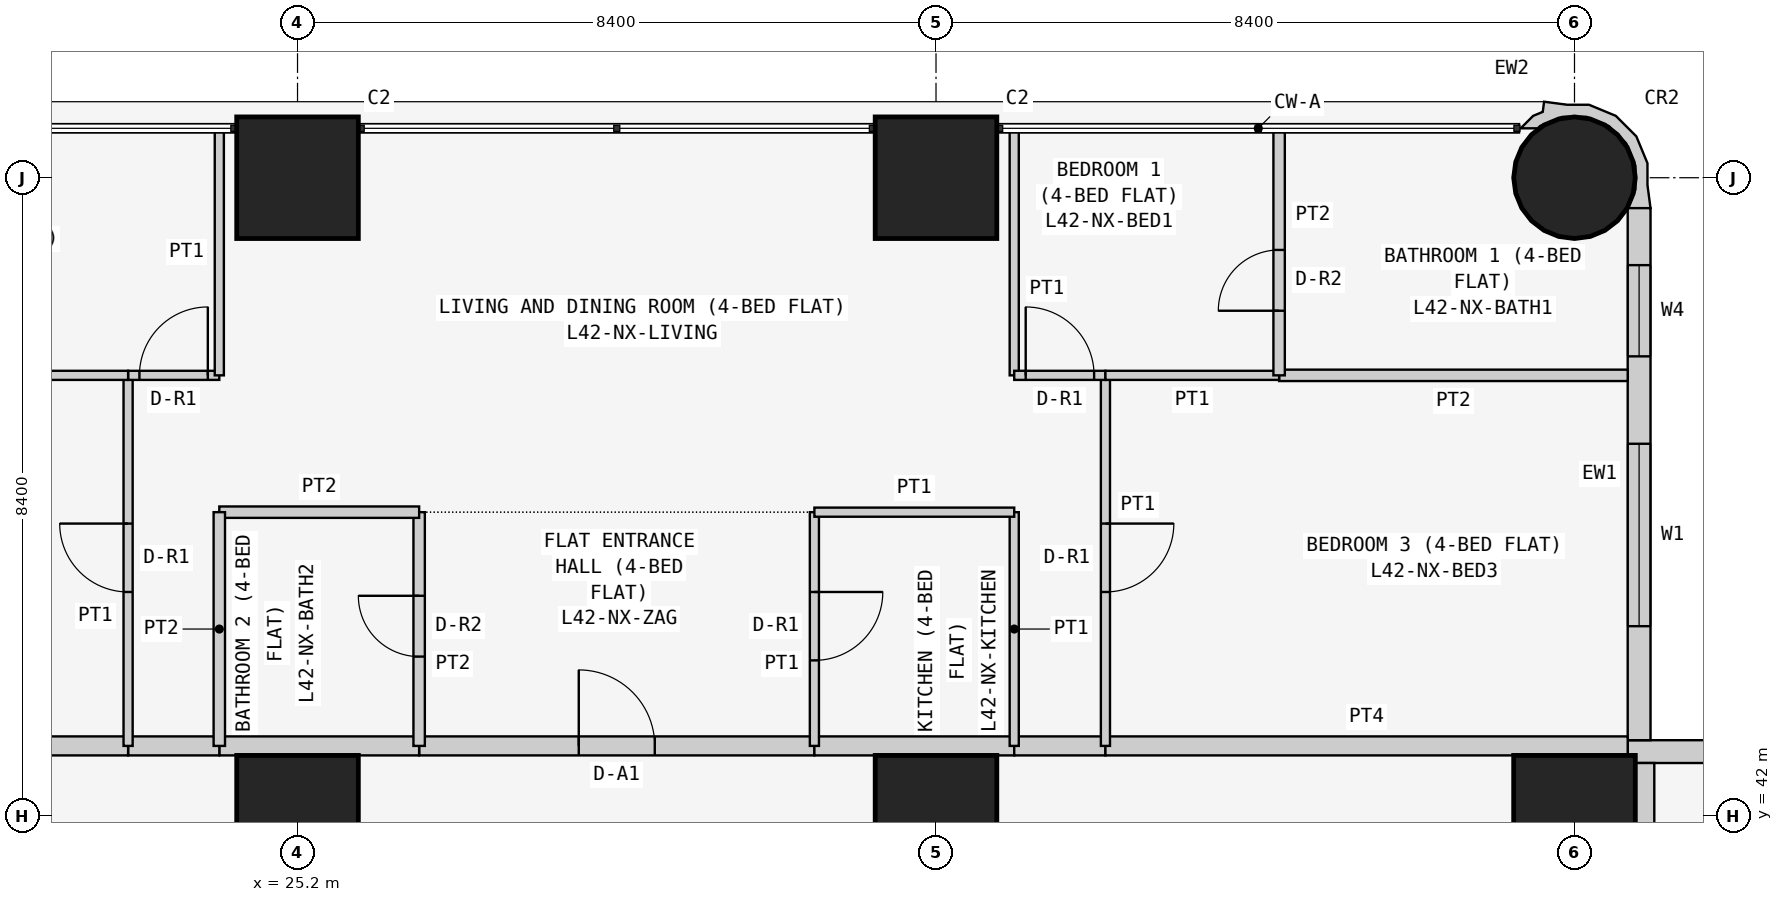
"""IFC4 building model, lengths in metres.
Left out: names, types, materials, properties, quantities, classifications, styles, units other than length and angle.
Written with IfcOpenShell. Run it as: python <this file> out.ifc"""

import sys

from ifc_helpers import new_model, si_unit, direction, frame, frame_2d, origin, origin_2d, place, context, subcontext, project, spatial, polyline, rectangle, circle, outline, extrude, element, fill, save


model = new_model("IFC4")
c1 = context("Model", 3, precision=1e-05, world=origin(), true_north=direction((0.0, 1.0)))
c2 = subcontext(c1, "Body", "Model", "MODEL_VIEW")
j1 = project(units=[si_unit("LENGTHUNIT", "METRE"), si_unit("PLANEANGLEUNIT", "RADIAN")], contexts=[c1])
p1 = place(None, origin())
s1 = spatial("IfcSite", under=j1, at=p1, CompositionType="ELEMENT")
p2 = place(p1, origin())
s2 = spatial("IfcBuilding", under=s1, at=p2, CompositionType="ELEMENT")
p3 = place(p2, frame((0.0, 0.0, 162.9)))
s3 = spatial("IfcBuildingStorey", under=s2, at=p3, CompositionType="ELEMENT", Elevation=162.9)
for number, where, z_axis, x_axis in (
    (1, (25.2, 42.0, 0.0), (0.0, 0.0, 1.0), (1.0, 0.0, 0.0)),
    (2, (25.2, 50.4, 0.0), (0.0, 0.0, 1.0), (1.0, 0.0, 0.0)),
    (3, (33.6, 42.0, 0.0), (0.0, 0.0, 1.0), (1.0, 0.0, 0.0)),
    (4, (33.6, 50.4, 0.0), (0.0, 0.0, 1.0), (1.0, 0.0, 0.0)),
    (5, (42.0, 42.0, 0.0), (0.0, 0.0, 1.0), (1.0, 0.0, 0.0)),
):
    element("IfcColumn", number, at=place(p3, frame(where, z_axis=z_axis, x_axis=x_axis)), inside=s3, PredefinedType="COLUMN", context=c2, shape_type="SweptSolid", body=[
        extrude(rectangle(XDim=1.6, YDim=1.6, at=origin_2d()), origin(), (0.0, 0.0, 1.0), 3.6),
    ])
p4 = place(p3, frame((42.0, 50.4, 0.0), z_axis=(0.0, 0.0, 1.0), x_axis=(1.0, 0.0, 0.0)))
e6 = element("IfcColumn", 6, at=p4, inside=s3, PredefinedType="COLUMN", context=c2, shape_type="SweptSolid", body=[
    extrude(circle(Radius=0.8, at=origin_2d()), origin(), (0.0, 0.0, 1.0), 3.6),
])
p5 = place(p3, frame((58.4, 42.85, 0.0), z_axis=(0.0, 0.0, 1.0), x_axis=(-1.0, 0.0, 0.0)))
e7 = element("IfcWall", 7, at=p5, inside=s3, PredefinedType="SOLIDWALL", context=c2, shape_type="SweptSolid", body=[
    extrude(rectangle(XDim=15.7, YDim=0.3, at=frame_2d((7.85, 0.0))), origin(), (0.0, 0.0, 1.0), 3.45),
])
p6 = place(p5, frame((12.4, 0.0, 0.9)))
e8 = element("IfcOpeningElement", 8, at=p6, cuts=e7, PredefinedType="OPENING", context=c2, shape_type="SweptSolid", body=[
    extrude(rectangle(XDim=1.8, YDim=1.5, at=frame_2d((0.9, 0.75))), frame((0.0, 0.16, 0.0), z_axis=(0.0, -1.0, 0.0), x_axis=(1.0, 0.0, 0.0)), (0.0, 0.0, 1.0), 0.32),
])
p7 = place(p5, frame((9.55, 0.0, 1.5)))
e9 = element("IfcOpeningElement", 9, at=p7, cuts=e7, PredefinedType="OPENING", context=c2, shape_type="SweptSolid", body=[
    extrude(rectangle(XDim=0.9, YDim=0.7, at=frame_2d((0.45, 0.35))), frame((0.0, 0.16, 0.0), z_axis=(0.0, -1.0, 0.0), x_axis=(1.0, 0.0, 0.0)), (0.0, 0.0, 1.0), 0.32),
])
p8 = place(p5, frame((5.1, 0.0, 0.9)))
e10 = element("IfcOpeningElement", 10, at=p8, cuts=e7, PredefinedType="OPENING", context=c2, shape_type="SweptSolid", body=[
    extrude(rectangle(XDim=1.8, YDim=1.5, at=frame_2d((0.9, 0.75))), frame((0.0, 0.16, 0.0), z_axis=(0.0, -1.0, 0.0), x_axis=(1.0, 0.0, 0.0)), (0.0, 0.0, 1.0), 0.32),
])
p9 = place(p5, frame((2.0, 0.0, 0.0)))
e11 = element("IfcOpeningElement", 11, at=p9, cuts=e7, PredefinedType="OPENING", context=c2, shape_type="SweptSolid", body=[
    extrude(rectangle(XDim=0.9, YDim=2.4, at=frame_2d((0.45, 1.2))), frame((0.0, 0.16, 0.0), z_axis=(0.0, -1.0, 0.0), x_axis=(1.0, 0.0, 0.0)), (0.0, 0.0, 1.0), 0.32),
])
p10 = place(p5, frame((0.7, 0.0, 0.9)))
e12 = element("IfcOpeningElement", 12, at=p10, cuts=e7, PredefinedType="OPENING", context=c2, shape_type="SweptSolid", body=[
    extrude(rectangle(XDim=1.2, YDim=1.5, at=frame_2d((0.6, 0.75))), frame((0.0, 0.16, 0.0), z_axis=(0.0, -1.0, 0.0), x_axis=(1.0, 0.0, 0.0)), (0.0, 0.0, 1.0), 0.32),
])
p11 = place(p3, frame((42.85, 43.0, 0.0), z_axis=(0.0, 0.0, 1.0), x_axis=(0.0, 1.0, 0.0)))
e13 = element("IfcWall", 13, at=p11, inside=s3, PredefinedType="SOLIDWALL", context=c2, shape_type="SweptSolid", body=[
    extrude(rectangle(XDim=7.0, YDim=0.3, at=frame_2d((3.5, 0.0))), origin(), (0.0, 0.0, 1.0), 3.45),
])
p12 = place(p11, frame((1.5, 0.0, 0.9)))
e14 = element("IfcOpeningElement", 14, at=p12, cuts=e13, PredefinedType="OPENING", context=c2, shape_type="SweptSolid", body=[
    extrude(rectangle(XDim=2.4, YDim=1.5, at=frame_2d((1.2, 0.75))), frame((0.0, 0.16, 0.0), z_axis=(0.0, -1.0, 0.0), x_axis=(1.0, 0.0, 0.0)), (0.0, 0.0, 1.0), 0.32),
])
p13 = place(p11, frame((5.05, 0.0, 0.9)))
e15 = element("IfcOpeningElement", 15, at=p13, cuts=e13, PredefinedType="OPENING", context=c2, shape_type="SweptSolid", body=[
    extrude(rectangle(XDim=1.2, YDim=1.5, at=frame_2d((0.6, 0.75))), frame((0.0, 0.16, 0.0), z_axis=(0.0, -1.0, 0.0), x_axis=(1.0, 0.0, 0.0)), (0.0, 0.0, 1.0), 0.32),
])
p14 = place(p3, frame((42.817, 50.073, 0.0), z_axis=(0.0, 0.0, 1.0), x_axis=(0.343276641956, 0.93923434088, 0.0)))
e16 = element("IfcWall", 16, at=p14, inside=s3, PredefinedType="SOLIDWALL", context=c2, shape_type="SweptSolid", body=[
    extrude(outline(polyline([(0.266, -0.055), (0.535, 0.044), (0.817, 0.302), (0.978, 0.648), (0.994, 1.03), (0.895, 1.3), (0.828, 1.598), (0.697, 1.569), (0.604, 1.67), (0.394, 1.767), (0.471, 1.556), (0.509, 1.539), (0.724, 1.304), (0.833, 1.005), (0.82, 0.687), (0.686, 0.397), (0.451, 0.182), (0.152, 0.073), (-0.116, 0.084), (-0.128, 0.078), (-0.146, 0.071), (-0.006, -0.197), (0.266, -0.055)])), origin(), (0.0, 0.0, 1.0), 3.45),
])
p15 = place(p3, frame((26.8, 42.925, 0.0), z_axis=(0.0, 0.0, 1.0), x_axis=(1.0, 0.0, 0.0)))
e17 = element("IfcWall", 17, at=p15, inside=s3, PredefinedType="PARTITIONING", context=c2, shape_type="SweptSolid", body=[
    extrude(rectangle(XDim=5.2, YDim=0.25, at=frame_2d((2.6, 0.0))), origin(), (0.0, 0.0, 1.0), 3.45),
])
p16 = place(p15, frame((2.1, 0.0, 0.0)))
e18 = element("IfcOpeningElement", 18, at=p16, cuts=e17, PredefinedType="OPENING", context=c2, shape_type="SweptSolid", body=[
    extrude(rectangle(XDim=1.0, YDim=2.1, at=frame_2d((0.5, 1.05))), frame((0.0, 0.135, 0.0), z_axis=(0.0, -1.0, 0.0), x_axis=(1.0, 0.0, 0.0)), (0.0, 0.0, 1.0), 0.27),
])
p17 = place(p3, frame((24.171, 42.925, 0.0), z_axis=(0.0, 0.0, 1.0), x_axis=(1.0, 0.0, 0.0)))
e19 = element("IfcWall", 19, at=p17, inside=s3, PredefinedType="PARTITIONING", context=c2, shape_type="SweptSolid", body=[
    extrude(rectangle(XDim=2.629, YDim=0.25, at=frame_2d((1.314, 0.0))), origin(), (0.0, 0.0, 1.0), 3.45),
])
p18 = place(p3, frame((32.0, 42.925, 0.0), z_axis=(0.0, 0.0, 1.0), x_axis=(1.0, 0.0, 0.0)))
e20 = element("IfcWall", 20, at=p18, inside=s3, PredefinedType="PARTITIONING", context=c2, shape_type="SweptSolid", body=[
    extrude(rectangle(XDim=2.629, YDim=0.25, at=frame_2d((1.314, 0.0))), origin(), (0.0, 0.0, 1.0), 3.45),
])
p19 = place(p3, frame((22.971, 42.925, 0.0), z_axis=(0.0, 0.0, 1.0), x_axis=(1.0, 0.0, 0.0)))
e21 = element("IfcWall", 21, at=p19, inside=s3, PredefinedType="PARTITIONING", context=c2, shape_type="SweptSolid", body=[
    extrude(rectangle(XDim=1.2, YDim=0.25, at=frame_2d((0.6, 0.0))), origin(), (0.0, 0.0, 1.0), 3.45),
])
p20 = place(p3, frame((34.629, 42.925, 0.0), z_axis=(0.0, 0.0, 1.0), x_axis=(1.0, 0.0, 0.0)))
e22 = element("IfcWall", 22, at=p20, inside=s3, PredefinedType="PARTITIONING", context=c2, shape_type="SweptSolid", body=[
    extrude(rectangle(XDim=1.2, YDim=0.25, at=frame_2d((0.6, 0.0))), origin(), (0.0, 0.0, 1.0), 3.45),
])
for number, where, z_axis, x_axis in (
    (23, (16.1, 42.925, 0.0), (0.0, 0.0, 1.0), (1.0, 0.0, 0.0)),
    (24, (35.829, 42.925, 0.0), (0.0, 0.0, 1.0), (1.0, 0.0, 0.0)),
):
    element("IfcWall", number, at=place(p3, frame(where, z_axis=z_axis, x_axis=x_axis)), inside=s3, PredefinedType="PARTITIONING", context=c2, shape_type="SweptSolid", body=[
        extrude(rectangle(XDim=6.871, YDim=0.25, at=frame_2d((3.436, 0.0))), origin(), (0.0, 0.0, 1.0), 3.45),
    ])
p21 = place(p3, frame((42.925, 42.7, 0.0), z_axis=(0.0, 0.0, 1.0), x_axis=(0.0, -1.0, 0.0)))
e25 = element("IfcWall", 25, at=p21, inside=s3, PredefinedType="PARTITIONING", context=c2, shape_type="SweptSolid", body=[
    extrude(rectangle(XDim=6.471, YDim=0.25, at=frame_2d((3.235, 0.0))), origin(), (0.0, 0.0, 1.0), 3.45),
])
p22 = place(p3, frame((26.8, 46.0, 0.0), z_axis=(0.0, 0.0, 1.0), x_axis=(0.0, -1.0, 0.0)))
e26 = element("IfcWall", 26, at=p22, inside=s3, PredefinedType="PARTITIONING", context=c2, shape_type="SweptSolid", body=[
    extrude(rectangle(XDim=3.075, YDim=0.15, at=frame_2d((1.538, 0.0))), origin(), (0.0, 0.0, 1.0), 3.45),
])
p23 = place(p22, frame((1.1, 0.0, 0.0)))
e27 = element("IfcOpeningElement", 27, at=p23, cuts=e26, PredefinedType="OPENING", context=c2, shape_type="SweptSolid", body=[
    extrude(rectangle(XDim=0.8, YDim=2.1, at=frame_2d((0.4, 1.05))), frame((0.0, 0.085, 0.0), z_axis=(0.0, -1.0, 0.0), x_axis=(1.0, 0.0, 0.0)), (0.0, 0.0, 1.0), 0.17),
])
p24 = place(p3, frame((32.0, 42.925, 0.0), z_axis=(0.0, 0.0, 1.0), x_axis=(0.0, 1.0, 0.0)))
e28 = element("IfcWall", 28, at=p24, inside=s3, PredefinedType="PARTITIONING", context=c2, shape_type="SweptSolid", body=[
    extrude(rectangle(XDim=3.075, YDim=0.12, at=frame_2d((1.538, 0.0))), origin(), (0.0, 0.0, 1.0), 3.45),
])
p25 = place(p24, frame((1.125, 0.0, 0.0)))
e29 = element("IfcOpeningElement", 29, at=p25, cuts=e28, PredefinedType="OPENING", context=c2, shape_type="SweptSolid", body=[
    extrude(rectangle(XDim=0.9, YDim=2.1, at=frame_2d((0.45, 1.05))), frame((0.0, 0.07, 0.0), z_axis=(0.0, -1.0, 0.0), x_axis=(1.0, 0.0, 0.0)), (0.0, 0.0, 1.0), 0.14),
])
p26 = place(p3, frame((26.8, 46.0, 0.0), z_axis=(0.0, 0.0, 1.0), x_axis=(-1.0, 0.0, 0.0)))
e30 = element("IfcWall", 30, at=p26, inside=s3, PredefinedType="PARTITIONING", context=c2, shape_type="SweptSolid", body=[
    extrude(rectangle(XDim=2.629, YDim=0.15, at=frame_2d((1.314, 0.0))), origin(), (0.0, 0.0, 1.0), 3.45),
])
p27 = place(p3, frame((24.171, 46.0, 0.0), z_axis=(0.0, 0.0, 1.0), x_axis=(0.0, -1.0, 0.0)))
e31 = element("IfcWall", 31, at=p27, inside=s3, PredefinedType="PARTITIONING", context=c2, shape_type="SweptSolid", body=[
    extrude(rectangle(XDim=3.075, YDim=0.15, at=frame_2d((1.538, 0.0))), origin(), (0.0, 0.0, 1.0), 3.45),
])
p28 = place(p3, frame((34.629, 42.925, 0.0), z_axis=(0.0, 0.0, 1.0), x_axis=(0.0, 1.0, 0.0)))
e32 = element("IfcWall", 32, at=p28, inside=s3, PredefinedType="PARTITIONING", context=c2, shape_type="SweptSolid", body=[
    extrude(rectangle(XDim=3.075, YDim=0.12, at=frame_2d((1.538, 0.0))), origin(), (0.0, 0.0, 1.0), 3.45),
])
p29 = place(p3, frame((34.629, 46.0, 0.0), z_axis=(0.0, 0.0, 1.0), x_axis=(-1.0, 0.0, 0.0)))
e33 = element("IfcWall", 33, at=p29, inside=s3, PredefinedType="PARTITIONING", context=c2, shape_type="SweptSolid", body=[
    extrude(rectangle(XDim=2.629, YDim=0.12, at=frame_2d((1.314, 0.0))), origin(), (0.0, 0.0, 1.0), 3.45),
])
p30 = place(p3, frame((22.971, 42.925, 0.0), z_axis=(0.0, 0.0, 1.0), x_axis=(0.0, 1.0, 0.0)))
e34 = element("IfcWall", 34, at=p30, inside=s3, PredefinedType="PARTITIONING", context=c2, shape_type="SweptSolid", body=[
    extrude(rectangle(XDim=4.875, YDim=0.12, at=frame_2d((2.438, 0.0))), origin(), (0.0, 0.0, 1.0), 3.45),
])
p31 = place(p30, frame((2.025, 0.0, 0.0)))
e35 = element("IfcOpeningElement", 35, at=p31, cuts=e34, PredefinedType="OPENING", context=c2, shape_type="SweptSolid", body=[
    extrude(rectangle(XDim=0.9, YDim=2.1, at=frame_2d((0.45, 1.05))), frame((0.0, 0.07, 0.0), z_axis=(0.0, -1.0, 0.0), x_axis=(1.0, 0.0, 0.0)), (0.0, 0.0, 1.0), 0.14),
])
p32 = place(p3, frame((22.971, 47.8, 0.0), z_axis=(0.0, 0.0, 1.0), x_axis=(1.0, 0.0, 0.0)))
e36 = element("IfcWall", 36, at=p32, inside=s3, PredefinedType="PARTITIONING", context=c2, shape_type="SweptSolid", body=[
    extrude(rectangle(XDim=1.2, YDim=0.12, at=frame_2d((0.6, 0.0))), origin(), (0.0, 0.0, 1.0), 3.45),
])
p33 = place(p32, frame((0.149, 0.0, 0.0)))
e37 = element("IfcOpeningElement", 37, at=p33, cuts=e36, PredefinedType="OPENING", context=c2, shape_type="SweptSolid", body=[
    extrude(rectangle(XDim=0.9, YDim=2.1, at=frame_2d((0.45, 1.05))), frame((0.0, 0.07, 0.0), z_axis=(0.0, -1.0, 0.0), x_axis=(1.0, 0.0, 0.0)), (0.0, 0.0, 1.0), 0.14),
])
p34 = place(p3, frame((24.171, 47.8, 0.0), z_axis=(0.0, 0.0, 1.0), x_axis=(0.0, 1.0, 0.0)))
e38 = element("IfcWall", 38, at=p34, inside=s3, PredefinedType="PARTITIONING", context=c2, shape_type="SweptSolid", body=[
    extrude(rectangle(XDim=3.25, YDim=0.12, at=frame_2d((1.625, 0.0))), origin(), (0.0, 0.0, 1.0), 3.45),
])
p35 = place(p3, frame((35.829, 47.8, 0.0), z_axis=(0.0, 0.0, 1.0), x_axis=(0.0, -1.0, 0.0)))
e39 = element("IfcWall", 39, at=p35, inside=s3, PredefinedType="PARTITIONING", context=c2, shape_type="SweptSolid", body=[
    extrude(rectangle(XDim=4.875, YDim=0.12, at=frame_2d((2.438, 0.0))), origin(), (0.0, 0.0, 1.0), 3.45),
])
p36 = place(p35, frame((1.95, 0.0, 0.0)))
e40 = element("IfcOpeningElement", 40, at=p36, cuts=e39, PredefinedType="OPENING", context=c2, shape_type="SweptSolid", body=[
    extrude(rectangle(XDim=0.9, YDim=2.1, at=frame_2d((0.45, 1.05))), frame((0.0, 0.07, 0.0), z_axis=(0.0, -1.0, 0.0), x_axis=(1.0, 0.0, 0.0)), (0.0, 0.0, 1.0), 0.14),
])
p37 = place(p3, frame((34.629, 51.05, 0.0), z_axis=(0.0, 0.0, 1.0), x_axis=(0.0, -1.0, 0.0)))
e41 = element("IfcWall", 41, at=p37, inside=s3, PredefinedType="PARTITIONING", context=c2, shape_type="SweptSolid", body=[
    extrude(rectangle(XDim=3.25, YDim=0.12, at=frame_2d((1.625, 0.0))), origin(), (0.0, 0.0, 1.0), 3.45),
])
p38 = place(p3, frame((34.629, 47.8, 0.0), z_axis=(0.0, 0.0, 1.0), x_axis=(1.0, 0.0, 0.0)))
e42 = element("IfcWall", 42, at=p38, inside=s3, PredefinedType="PARTITIONING", context=c2, shape_type="SweptSolid", body=[
    extrude(rectangle(XDim=1.2, YDim=0.12, at=frame_2d((0.6, 0.0))), origin(), (0.0, 0.0, 1.0), 3.45),
])
p39 = place(p38, frame((0.151, 0.0, 0.0)))
e43 = element("IfcOpeningElement", 43, at=p39, cuts=e42, PredefinedType="OPENING", context=c2, shape_type="SweptSolid", body=[
    extrude(rectangle(XDim=0.9, YDim=2.1, at=frame_2d((0.45, 1.05))), frame((0.0, 0.07, 0.0), z_axis=(0.0, -1.0, 0.0), x_axis=(1.0, 0.0, 0.0)), (0.0, 0.0, 1.0), 0.14),
])
p40 = place(p3, frame((22.971, 47.8, 0.0), z_axis=(0.0, 0.0, 1.0), x_axis=(-1.0, 0.0, 0.0)))
e44 = element("IfcWall", 44, at=p40, inside=s3, PredefinedType="PARTITIONING", context=c2, shape_type="SweptSolid", body=[
    extrude(rectangle(XDim=6.871, YDim=0.12, at=frame_2d((3.436, 0.0))), origin(), (0.0, 0.0, 1.0), 3.45),
])
p41 = place(p3, frame((42.7, 47.8, 0.0), z_axis=(0.0, 0.0, 1.0), x_axis=(-1.0, 0.0, 0.0)))
e45 = element("IfcWall", 45, at=p41, inside=s3, PredefinedType="PARTITIONING", context=c2, shape_type="SweptSolid", body=[
    extrude(rectangle(XDim=4.586, YDim=0.15, at=frame_2d((2.293, 0.0))), origin(), (0.0, 0.0, 1.0), 3.45),
])
p42 = place(p3, frame((38.114, 47.8, 0.0), z_axis=(0.0, 0.0, 1.0), x_axis=(-1.0, 0.0, 0.0)))
e46 = element("IfcWall", 46, at=p42, inside=s3, PredefinedType="PARTITIONING", context=c2, shape_type="SweptSolid", body=[
    extrude(rectangle(XDim=2.285, YDim=0.12, at=frame_2d((1.143, 0.0))), origin(), (0.0, 0.0, 1.0), 3.45),
])
p43 = place(p3, frame((38.114, 51.05, 0.0), z_axis=(0.0, 0.0, 1.0), x_axis=(0.0, -1.0, 0.0)))
e47 = element("IfcWall", 47, at=p43, inside=s3, PredefinedType="PARTITIONING", context=c2, shape_type="SweptSolid", body=[
    extrude(rectangle(XDim=3.25, YDim=0.15, at=frame_2d((1.625, 0.0))), origin(), (0.0, 0.0, 1.0), 3.45),
])
p44 = place(p43, frame((1.6, 0.0, 0.0)))
e48 = element("IfcOpeningElement", 48, at=p44, cuts=e47, PredefinedType="OPENING", context=c2, shape_type="SweptSolid", body=[
    extrude(rectangle(XDim=0.8, YDim=2.1, at=frame_2d((0.4, 1.05))), frame((0.0, 0.085, 0.0), z_axis=(0.0, -1.0, 0.0), x_axis=(1.0, 0.0, 0.0)), (0.0, 0.0, 1.0), 0.17),
])
p45 = place(p12, origin())
e49 = element("IfcWindow", 49, at=p45, inside=s3, PartitioningType="SINGLE_PANEL", PredefinedType="WINDOW", context=c2, shape_type="SweptSolid", body=[
    extrude(rectangle(XDim=2.4, YDim=1.5, at=frame_2d((1.2, 0.75))), frame((0.0, 0.03, 0.0), z_axis=(0.0, -1.0, 0.0), x_axis=(1.0, 0.0, 0.0)), (0.0, 0.0, 1.0), 0.06),
])
fill(e14, e49)
p46 = place(p13, origin())
e50 = element("IfcWindow", 50, at=p46, inside=s3, PartitioningType="SINGLE_PANEL", PredefinedType="WINDOW", context=c2, shape_type="SweptSolid", body=[
    extrude(rectangle(XDim=1.2, YDim=1.5, at=frame_2d((0.6, 0.75))), frame((0.0, 0.03, 0.0), z_axis=(0.0, -1.0, 0.0), x_axis=(1.0, 0.0, 0.0)), (0.0, 0.0, 1.0), 0.06),
])
fill(e15, e50)
p47 = place(p16, origin())
e51 = element("IfcDoor", 51, at=p47, inside=s3, OperationType="SINGLE_SWING_LEFT", PredefinedType="DOOR", context=c2, shape_type="SweptSolid", body=[
    extrude(rectangle(XDim=1.0, YDim=2.1, at=frame_2d((0.5, 1.05))), frame((0.0, 0.025, 0.0), z_axis=(0.0, -1.0, 0.0), x_axis=(1.0, 0.0, 0.0)), (0.0, 0.0, 1.0), 0.05),
])
fill(e18, e51)
p48 = place(p23, frame((0.8, 0.0, 0.0), z_axis=(0.0, 0.0, 1.0), x_axis=(-1.0, 0.0, 0.0)))
e52 = element("IfcDoor", 52, at=p48, inside=s3, OperationType="SINGLE_SWING_RIGHT", PredefinedType="DOOR", context=c2, shape_type="SweptSolid", body=[
    extrude(rectangle(XDim=0.8, YDim=2.1, at=frame_2d((0.4, 1.05))), frame((0.0, 0.025, 0.0), z_axis=(0.0, -1.0, 0.0), x_axis=(1.0, 0.0, 0.0)), (0.0, 0.0, 1.0), 0.05),
])
fill(e27, e52)
p49 = place(p25, frame((0.9, 0.0, 0.0), z_axis=(0.0, 0.0, 1.0), x_axis=(-1.0, 0.0, 0.0)))
e53 = element("IfcDoor", 53, at=p49, inside=s3, OperationType="SINGLE_SWING_LEFT", PredefinedType="DOOR", context=c2, shape_type="SweptSolid", body=[
    extrude(rectangle(XDim=0.9, YDim=2.1, at=frame_2d((0.45, 1.05))), frame((0.0, 0.025, 0.0), z_axis=(0.0, -1.0, 0.0), x_axis=(1.0, 0.0, 0.0)), (0.0, 0.0, 1.0), 0.05),
])
fill(e29, e53)
p50 = place(p31, origin())
e54 = element("IfcDoor", 54, at=p50, inside=s3, OperationType="SINGLE_SWING_RIGHT", PredefinedType="DOOR", context=c2, shape_type="SweptSolid", body=[
    extrude(rectangle(XDim=0.9, YDim=2.1, at=frame_2d((0.45, 1.05))), frame((0.0, 0.025, 0.0), z_axis=(0.0, -1.0, 0.0), x_axis=(1.0, 0.0, 0.0)), (0.0, 0.0, 1.0), 0.05),
])
fill(e35, e54)
p51 = place(p33, origin())
e55 = element("IfcDoor", 55, at=p51, inside=s3, OperationType="SINGLE_SWING_RIGHT", PredefinedType="DOOR", context=c2, shape_type="SweptSolid", body=[
    extrude(rectangle(XDim=0.9, YDim=2.1, at=frame_2d((0.45, 1.05))), frame((0.0, 0.025, 0.0), z_axis=(0.0, -1.0, 0.0), x_axis=(1.0, 0.0, 0.0)), (0.0, 0.0, 1.0), 0.05),
])
fill(e37, e55)
p52 = place(p36, origin())
e56 = element("IfcDoor", 56, at=p52, inside=s3, OperationType="SINGLE_SWING_LEFT", PredefinedType="DOOR", context=c2, shape_type="SweptSolid", body=[
    extrude(rectangle(XDim=0.9, YDim=2.1, at=frame_2d((0.45, 1.05))), frame((0.0, 0.025, 0.0), z_axis=(0.0, -1.0, 0.0), x_axis=(1.0, 0.0, 0.0)), (0.0, 0.0, 1.0), 0.05),
])
fill(e40, e56)
p53 = place(p39, origin())
e57 = element("IfcDoor", 57, at=p53, inside=s3, OperationType="SINGLE_SWING_LEFT", PredefinedType="DOOR", context=c2, shape_type="SweptSolid", body=[
    extrude(rectangle(XDim=0.9, YDim=2.1, at=frame_2d((0.45, 1.05))), frame((0.0, 0.025, 0.0), z_axis=(0.0, -1.0, 0.0), x_axis=(1.0, 0.0, 0.0)), (0.0, 0.0, 1.0), 0.05),
])
fill(e43, e57)
p54 = place(p44, frame((0.8, 0.0, 0.0), z_axis=(0.0, 0.0, 1.0), x_axis=(-1.0, 0.0, 0.0)))
e58 = element("IfcDoor", 58, at=p54, inside=s3, OperationType="SINGLE_SWING_LEFT", PredefinedType="DOOR", context=c2, shape_type="SweptSolid", body=[
    extrude(rectangle(XDim=0.8, YDim=2.1, at=frame_2d((0.4, 1.05))), frame((0.0, 0.025, 0.0), z_axis=(0.0, -1.0, 0.0), x_axis=(1.0, 0.0, 0.0)), (0.0, 0.0, 1.0), 0.05),
])
fill(e48, e58)
save(model, sys.argv[1])
